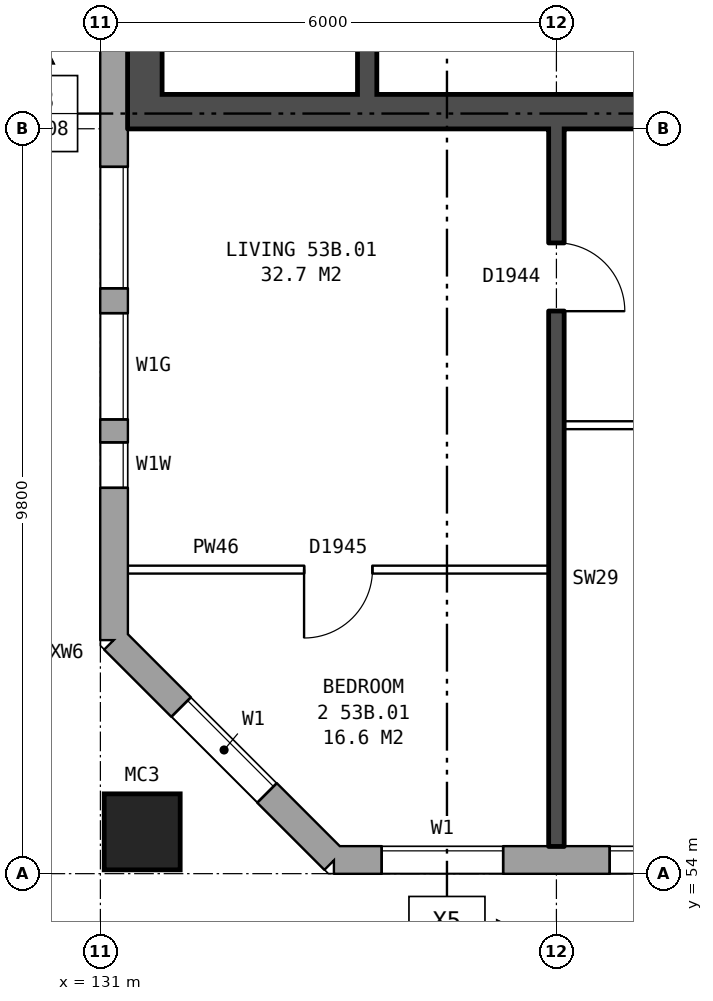
"""IFC4 building model, lengths in metres.
Left out: names, types, materials, properties, quantities, classifications, styles, units other than length and angle.
Written with IfcOpenShell. Run it as: python <this file> out.ifc"""

import sys

from ifc_helpers import new_model, si_unit, direction, frame, frame_2d, origin, origin_2d, place, context, subcontext, project, spatial, rectangle, hollow_rectangle, extrude, element, fill, save


model = new_model("IFC4")
c1 = context("Model", 3, precision=1e-05, world=origin(), true_north=direction((0.0, 1.0)))
c2 = subcontext(c1, "Body", "Model", "MODEL_VIEW")
j1 = project(units=[si_unit("LENGTHUNIT", "METRE"), si_unit("PLANEANGLEUNIT", "RADIAN")], contexts=[c1])
p1 = place(None, origin())
s1 = spatial("IfcSite", under=j1, at=p1, CompositionType="ELEMENT")
p2 = place(p1, origin())
s2 = spatial("IfcBuilding", under=s1, at=p2, CompositionType="ELEMENT")
p3 = place(p2, frame((0.0, 0.0, 188.2)))
s3 = spatial("IfcBuildingStorey", under=s2, at=p3, CompositionType="ELEMENT", Elevation=188.2)
p4 = place(p3, frame((131.55, 54.55, 0.0), z_axis=(0.0, 0.0, 1.0), x_axis=(1.0, 0.0, 0.0)))
e1 = element("IfcColumn", 1, at=p4, inside=s3, PredefinedType="COLUMN", context=c2, shape_type="SweptSolid", body=[
    extrude(hollow_rectangle(XDim=1.0, YDim=1.0, WallThickness=0.055, at=origin_2d()), origin(), (0.0, 0.0, 1.0), 3.1),
])
p5 = place(p3, frame((131.18, 57.075, 0.0), z_axis=(0.0, 0.0, 1.0), x_axis=(0.707106781187, -0.707106781187, 0.0)))
e2 = element("IfcWall", 2, at=p5, inside=s3, PredefinedType="STANDARD", context=c2, shape_type="SweptSolid", body=[
    extrude(rectangle(XDim=4.094, YDim=0.36, at=frame_2d((2.047, 0.0))), origin(), (0.0, 0.0, 1.0), 2.85),
])
p6 = place(p5, frame((1.247, 0.0, 0.8)))
e3 = element("IfcOpeningElement", 3, at=p6, cuts=e2, PredefinedType="OPENING", context=c2, shape_type="SweptSolid", body=[
    extrude(rectangle(XDim=1.6, YDim=1.8, at=frame_2d((0.8, 0.9))), frame((0.0, 0.19, 0.0), z_axis=(0.0, -1.0, 0.0), x_axis=(1.0, 0.0, 0.0)), (0.0, 0.0, 1.0), 0.38),
])
p7 = place(p3, frame((134.075, 54.18, 0.0), z_axis=(0.0, 0.0, 1.0), x_axis=(1.0, 0.0, 0.0)))
e4 = element("IfcWall", 4, at=p7, inside=s3, PredefinedType="STANDARD", context=c2, shape_type="SweptSolid", body=[
    extrude(rectangle(XDim=33.101, YDim=0.36, at=frame_2d((16.55, 0.0))), origin(), (0.0, 0.0, 1.0), 2.85),
])
p8 = place(p7, frame((0.625, 0.0, 0.8)))
e5 = element("IfcOpeningElement", 5, at=p8, cuts=e4, PredefinedType="OPENING", context=c2, shape_type="SweptSolid", body=[
    extrude(rectangle(XDim=1.6, YDim=1.8, at=frame_2d((0.8, 0.9))), frame((0.0, 0.19, 0.0), z_axis=(0.0, -1.0, 0.0), x_axis=(1.0, 0.0, 0.0)), (0.0, 0.0, 1.0), 0.38),
])
p9 = place(p7, frame((3.625, 0.0, 0.8)))
e6 = element("IfcOpeningElement", 6, at=p9, cuts=e4, PredefinedType="OPENING", context=c2, shape_type="SweptSolid", body=[
    extrude(rectangle(XDim=1.6, YDim=1.8, at=frame_2d((0.8, 0.9))), frame((0.0, 0.19, 0.0), z_axis=(0.0, -1.0, 0.0), x_axis=(1.0, 0.0, 0.0)), (0.0, 0.0, 1.0), 0.38),
])
p10 = place(p7, frame((6.625, 0.0, 0.8)))
e7 = element("IfcOpeningElement", 7, at=p10, cuts=e4, PredefinedType="OPENING", context=c2, shape_type="SweptSolid", body=[
    extrude(rectangle(XDim=1.6, YDim=1.8, at=frame_2d((0.8, 0.9))), frame((0.0, 0.19, 0.0), z_axis=(0.0, -1.0, 0.0), x_axis=(1.0, 0.0, 0.0)), (0.0, 0.0, 1.0), 0.38),
])
p11 = place(p7, frame((9.625, 0.0, 0.8)))
e8 = element("IfcOpeningElement", 8, at=p11, cuts=e4, PredefinedType="OPENING", context=c2, shape_type="SweptSolid", body=[
    extrude(rectangle(XDim=1.6, YDim=1.8, at=frame_2d((0.8, 0.9))), frame((0.0, 0.19, 0.0), z_axis=(0.0, -1.0, 0.0), x_axis=(1.0, 0.0, 0.0)), (0.0, 0.0, 1.0), 0.38),
])
p12 = place(p7, frame((12.975, 0.0, 0.15)))
e9 = element("IfcOpeningElement", 9, at=p12, cuts=e4, PredefinedType="OPENING", context=c2, shape_type="SweptSolid", body=[
    extrude(rectangle(XDim=0.6, YDim=0.9, at=frame_2d((0.3, 0.45))), frame((0.0, 0.19, 0.0), z_axis=(0.0, -1.0, 0.0), x_axis=(1.0, 0.0, 0.0)), (0.0, 0.0, 1.0), 0.38),
])
p13 = place(p7, frame((15.625, 0.0, 0.8)))
e10 = element("IfcOpeningElement", 10, at=p13, cuts=e4, PredefinedType="OPENING", context=c2, shape_type="SweptSolid", body=[
    extrude(rectangle(XDim=1.6, YDim=1.8, at=frame_2d((0.8, 0.9))), frame((0.0, 0.19, 0.0), z_axis=(0.0, -1.0, 0.0), x_axis=(1.0, 0.0, 0.0)), (0.0, 0.0, 1.0), 0.38),
])
p14 = place(p7, frame((18.075, 0.0, 0.45)))
e11 = element("IfcOpeningElement", 11, at=p14, cuts=e4, PredefinedType="OPENING", context=c2, shape_type="SweptSolid", body=[
    extrude(rectangle(XDim=1.0, YDim=1.8, at=frame_2d((0.5, 0.9))), frame((0.0, 0.19, 0.0), z_axis=(0.0, -1.0, 0.0), x_axis=(1.0, 0.0, 0.0)), (0.0, 0.0, 1.0), 0.38),
])
p15 = place(p7, frame((21.625, 0.0, 0.8)))
e12 = element("IfcOpeningElement", 12, at=p15, cuts=e4, PredefinedType="OPENING", context=c2, shape_type="SweptSolid", body=[
    extrude(rectangle(XDim=1.6, YDim=1.8, at=frame_2d((0.8, 0.9))), frame((0.0, 0.19, 0.0), z_axis=(0.0, -1.0, 0.0), x_axis=(1.0, 0.0, 0.0)), (0.0, 0.0, 1.0), 0.38),
])
p16 = place(p7, frame((24.625, 0.0, 0.8)))
e13 = element("IfcOpeningElement", 13, at=p16, cuts=e4, PredefinedType="OPENING", context=c2, shape_type="SweptSolid", body=[
    extrude(rectangle(XDim=1.6, YDim=1.8, at=frame_2d((0.8, 0.9))), frame((0.0, 0.19, 0.0), z_axis=(0.0, -1.0, 0.0), x_axis=(1.0, 0.0, 0.0)), (0.0, 0.0, 1.0), 0.38),
])
p17 = place(p7, frame((27.625, 0.0, 0.8)))
e14 = element("IfcOpeningElement", 14, at=p17, cuts=e4, PredefinedType="OPENING", context=c2, shape_type="SweptSolid", body=[
    extrude(rectangle(XDim=1.6, YDim=1.8, at=frame_2d((0.8, 0.9))), frame((0.0, 0.19, 0.0), z_axis=(0.0, -1.0, 0.0), x_axis=(1.0, 0.0, 0.0)), (0.0, 0.0, 1.0), 0.38),
])
p18 = place(p7, frame((30.625, 0.0, 0.8)))
e15 = element("IfcOpeningElement", 15, at=p18, cuts=e4, PredefinedType="OPENING", context=c2, shape_type="SweptSolid", body=[
    extrude(rectangle(XDim=1.6, YDim=1.8, at=frame_2d((0.8, 0.9))), frame((0.0, 0.19, 0.0), z_axis=(0.0, -1.0, 0.0), x_axis=(1.0, 0.0, 0.0)), (0.0, 0.0, 1.0), 0.38),
])
p19 = place(p7, frame((13.875, 0.0, 0.25)))
e16 = element("IfcOpeningElement", 16, at=p19, cuts=e4, PredefinedType="OPENING", context=c2, shape_type="SweptSolid", body=[
    extrude(rectangle(XDim=0.8, YDim=1.8, at=frame_2d((0.4, 0.9))), frame((0.0, 0.19, 0.0), z_axis=(0.0, -1.0, 0.0), x_axis=(1.0, 0.0, 0.0)), (0.0, 0.0, 1.0), 0.38),
])
p20 = place(p7, frame((19.375, 0.0, 0.35)))
e17 = element("IfcOpeningElement", 17, at=p20, cuts=e4, PredefinedType="OPENING", context=c2, shape_type="SweptSolid", body=[
    extrude(rectangle(XDim=0.6, YDim=0.9, at=frame_2d((0.3, 0.45))), frame((0.0, 0.19, 0.0), z_axis=(0.0, -1.0, 0.0), x_axis=(1.0, 0.0, 0.0)), (0.0, 0.0, 1.0), 0.38),
])
p21 = place(p3, frame((131.18, 82.925, 0.0), z_axis=(0.0, 0.0, 1.0), x_axis=(0.0, -1.0, 0.0)))
e18 = element("IfcWall", 18, at=p21, inside=s3, PredefinedType="STANDARD", context=c2, shape_type="SweptSolid", body=[
    extrude(rectangle(XDim=25.851, YDim=0.36, at=frame_2d((12.925, 0.0))), origin(), (0.0, 0.0, 1.0), 2.85),
])
p22 = place(p21, frame((1.975, 0.0, 1.7)))
e19 = element("IfcOpeningElement", 19, at=p22, cuts=e18, PredefinedType="OPENING", context=c2, shape_type="SweptSolid", body=[
    extrude(rectangle(XDim=1.0, YDim=0.9, at=frame_2d((0.5, 0.45))), frame((0.0, 0.19, 0.0), z_axis=(0.0, -1.0, 0.0), x_axis=(1.0, 0.0, 0.0)), (0.0, 0.0, 1.0), 0.38),
])
p23 = place(p21, frame((4.625, 0.0, 0.8)))
e20 = element("IfcOpeningElement", 20, at=p23, cuts=e18, PredefinedType="OPENING", context=c2, shape_type="SweptSolid", body=[
    extrude(rectangle(XDim=1.6, YDim=1.8, at=frame_2d((0.8, 0.9))), frame((0.0, 0.19, 0.0), z_axis=(0.0, -1.0, 0.0), x_axis=(1.0, 0.0, 0.0)), (0.0, 0.0, 1.0), 0.38),
])
p24 = place(p21, frame((19.625, 0.0, 0.8)))
e21 = element("IfcOpeningElement", 21, at=p24, cuts=e18, PredefinedType="OPENING", context=c2, shape_type="SweptSolid", body=[
    extrude(rectangle(XDim=1.6, YDim=1.8, at=frame_2d((0.8, 0.9))), frame((0.0, 0.19, 0.0), z_axis=(0.0, -1.0, 0.0), x_axis=(1.0, 0.0, 0.0)), (0.0, 0.0, 1.0), 0.38),
])
p25 = place(p21, frame((21.55, 0.0, 1.1)))
e22 = element("IfcOpeningElement", 22, at=p25, cuts=e18, PredefinedType="OPENING", context=c2, shape_type="SweptSolid", body=[
    extrude(rectangle(XDim=1.4, YDim=1.5, at=frame_2d((0.7, 0.75))), frame((0.0, 0.19, 0.0), z_axis=(0.0, -1.0, 0.0), x_axis=(1.0, 0.0, 0.0)), (0.0, 0.0, 1.0), 0.38),
])
p26 = place(p21, frame((3.325, 0.0, 0.8)))
e23 = element("IfcOpeningElement", 23, at=p26, cuts=e18, PredefinedType="OPENING", context=c2, shape_type="SweptSolid", body=[
    extrude(rectangle(XDim=1.0, YDim=1.8, at=frame_2d((0.5, 0.9))), frame((0.0, 0.19, 0.0), z_axis=(0.0, -1.0, 0.0), x_axis=(1.0, 0.0, 0.0)), (0.0, 0.0, 1.0), 0.38),
])
p27 = place(p21, frame((23.25, 0.0, 1.7)))
e24 = element("IfcOpeningElement", 24, at=p27, cuts=e18, PredefinedType="OPENING", context=c2, shape_type="SweptSolid", body=[
    extrude(rectangle(XDim=0.6, YDim=0.9, at=frame_2d((0.3, 0.45))), frame((0.0, 0.19, 0.0), z_axis=(0.0, -1.0, 0.0), x_axis=(1.0, 0.0, 0.0)), (0.0, 0.0, 1.0), 0.38),
])
p28 = place(p3, frame((131.585, 63.8, 0.0), z_axis=(0.0, 0.0, 1.0), x_axis=(0.0, 1.0, 0.0)))
e25 = element("IfcWall", 25, at=p28, inside=s3, PredefinedType="SHEAR", context=c2, shape_type="SweptSolid", body=[
    extrude(rectangle(XDim=12.4, YDim=0.45, at=frame_2d((6.2, 0.0))), origin(), (0.0, 0.0, 1.0), 2.85),
])
p29 = place(p3, frame((139.31, 64.025, 0.0), z_axis=(0.0, 0.0, 1.0), x_axis=(-1.0, 0.0, 0.0)))
e26 = element("IfcWall", 26, at=p29, inside=s3, PredefinedType="SHEAR", context=c2, shape_type="SweptSolid", body=[
    extrude(rectangle(XDim=7.5, YDim=0.45, at=frame_2d((3.75, 0.0))), origin(), (0.0, 0.0, 1.0), 2.85),
])
p30 = place(p3, frame((134.51, 64.25, 0.0), z_axis=(0.0, 0.0, 1.0), x_axis=(0.0, 1.0, 0.0)))
e27 = element("IfcWall", 27, at=p30, inside=s3, PredefinedType="SHEAR", context=c2, shape_type="SweptSolid", body=[
    extrude(rectangle(XDim=6.875, YDim=0.25, at=frame_2d((3.438, 0.0))), origin(), (0.0, 0.0, 1.0), 2.85),
])
p31 = place(p3, frame((131.36, 58.0, 0.0), z_axis=(0.0, 0.0, 1.0), x_axis=(1.0, 0.0, 0.0)))
e28 = element("IfcWall", 28, at=p31, inside=s3, PredefinedType="PARTITIONING", context=c2, shape_type="SweptSolid", body=[
    extrude(rectangle(XDim=5.54, YDim=0.1, at=frame_2d((2.77, 0.0))), origin(), (0.0, 0.0, 1.0), 2.85),
])
p32 = place(p31, frame((2.32, 0.0, 0.0)))
e29 = element("IfcOpeningElement", 29, at=p32, cuts=e28, PredefinedType="OPENING", context=c2, shape_type="SweptSolid", body=[
    extrude(rectangle(XDim=0.9, YDim=2.1, at=frame_2d((0.45, 1.05))), frame((0.0, 0.06, 0.0), z_axis=(0.0, -1.0, 0.0), x_axis=(1.0, 0.0, 0.0)), (0.0, 0.0, 1.0), 0.12),
])
p33 = place(p3, frame((137.1, 59.9, 0.0), z_axis=(0.0, 0.0, 1.0), x_axis=(1.0, 0.0, 0.0)))
e30 = element("IfcWall", 30, at=p33, inside=s3, PredefinedType="PARTITIONING", context=c2, shape_type="SweptSolid", body=[
    extrude(rectangle(XDim=5.8, YDim=0.1, at=frame_2d((2.9, 0.0))), origin(), (0.0, 0.0, 1.0), 2.85),
])
p34 = place(p33, frame((1.3, 0.0, 0.0)))
e31 = element("IfcOpeningElement", 31, at=p34, cuts=e30, PredefinedType="OPENING", context=c2, shape_type="SweptSolid", body=[
    extrude(rectangle(XDim=0.9, YDim=2.1, at=frame_2d((0.45, 1.05))), frame((0.0, 0.06, 0.0), z_axis=(0.0, -1.0, 0.0), x_axis=(1.0, 0.0, 0.0)), (0.0, 0.0, 1.0), 0.12),
])
p35 = place(p33, frame((4.2, 0.0, 0.0)))
e32 = element("IfcOpeningElement", 32, at=p35, cuts=e30, PredefinedType="OPENING", context=c2, shape_type="SweptSolid", body=[
    extrude(rectangle(XDim=0.9, YDim=2.1, at=frame_2d((0.45, 1.05))), frame((0.0, 0.06, 0.0), z_axis=(0.0, -1.0, 0.0), x_axis=(1.0, 0.0, 0.0)), (0.0, 0.0, 1.0), 0.12),
])
p36 = place(p3, frame((137.0, 54.36, 0.0), z_axis=(0.0, 0.0, 1.0), x_axis=(0.0, 1.0, 0.0)))
e33 = element("IfcWall", 33, at=p36, inside=s3, PredefinedType="SOLIDWALL", context=c2, shape_type="SweptSolid", body=[
    extrude(rectangle(XDim=9.44, YDim=0.2, at=frame_2d((4.72, 0.0))), origin(), (0.0, 0.0, 1.0), 2.85),
])
p37 = place(p36, frame((7.04, 0.0, 0.0)))
e34 = element("IfcOpeningElement", 34, at=p37, cuts=e33, PredefinedType="OPENING", context=c2, shape_type="SweptSolid", body=[
    extrude(rectangle(XDim=0.9, YDim=2.1, at=frame_2d((0.45, 1.05))), frame((0.0, 0.11, 0.0), z_axis=(0.0, -1.0, 0.0), x_axis=(1.0, 0.0, 0.0)), (0.0, 0.0, 1.0), 0.22),
])
p38 = place(p6, origin())
e35 = element("IfcWindow", 35, at=p38, inside=s3, PartitioningType="SINGLE_PANEL", PredefinedType="WINDOW", context=c2, shape_type="SweptSolid", body=[
    extrude(rectangle(XDim=1.6, YDim=1.8, at=frame_2d((0.8, 0.9))), frame((0.0, 0.15, 0.0), z_axis=(0.0, -1.0, 0.0), x_axis=(1.0, 0.0, 0.0)), (0.0, 0.0, 1.0), 0.06),
])
fill(e3, e35)
p39 = place(p8, origin())
e36 = element("IfcWindow", 36, at=p39, inside=s3, PartitioningType="SINGLE_PANEL", PredefinedType="WINDOW", context=c2, shape_type="SweptSolid", body=[
    extrude(rectangle(XDim=1.6, YDim=1.8, at=frame_2d((0.8, 0.9))), frame((0.0, 0.15, 0.0), z_axis=(0.0, -1.0, 0.0), x_axis=(1.0, 0.0, 0.0)), (0.0, 0.0, 1.0), 0.06),
])
fill(e5, e36)
p40 = place(p9, origin())
e37 = element("IfcWindow", 37, at=p40, inside=s3, PartitioningType="SINGLE_PANEL", PredefinedType="WINDOW", context=c2, shape_type="SweptSolid", body=[
    extrude(rectangle(XDim=1.6, YDim=1.8, at=frame_2d((0.8, 0.9))), frame((0.0, 0.15, 0.0), z_axis=(0.0, -1.0, 0.0), x_axis=(1.0, 0.0, 0.0)), (0.0, 0.0, 1.0), 0.06),
])
fill(e6, e37)
p41 = place(p24, origin())
e38 = element("IfcWindow", 38, at=p41, inside=s3, PartitioningType="SINGLE_PANEL", PredefinedType="WINDOW", context=c2, shape_type="SweptSolid", body=[
    extrude(rectangle(XDim=1.6, YDim=1.8, at=frame_2d((0.8, 0.9))), frame((0.0, 0.15, 0.0), z_axis=(0.0, -1.0, 0.0), x_axis=(1.0, 0.0, 0.0)), (0.0, 0.0, 1.0), 0.06),
])
fill(e21, e38)
p42 = place(p25, origin())
e39 = element("IfcWindow", 39, at=p42, inside=s3, PartitioningType="SINGLE_PANEL", PredefinedType="WINDOW", context=c2, shape_type="SweptSolid", body=[
    extrude(rectangle(XDim=1.4, YDim=1.5, at=frame_2d((0.7, 0.75))), frame((0.0, 0.15, 0.0), z_axis=(0.0, -1.0, 0.0), x_axis=(1.0, 0.0, 0.0)), (0.0, 0.0, 1.0), 0.06),
])
fill(e22, e39)
p43 = place(p32, frame((0.9, 0.0, 0.0), z_axis=(0.0, 0.0, 1.0), x_axis=(-1.0, 0.0, 0.0)))
e40 = element("IfcDoor", 40, at=p43, inside=s3, OperationType="SINGLE_SWING_RIGHT", PredefinedType="DOOR", context=c2, shape_type="SweptSolid", body=[
    extrude(rectangle(XDim=0.9, YDim=2.1, at=frame_2d((0.45, 1.05))), frame((0.0, 0.025, 0.0), z_axis=(0.0, -1.0, 0.0), x_axis=(1.0, 0.0, 0.0)), (0.0, 0.0, 1.0), 0.05),
])
fill(e29, e40)
p44 = place(p37, frame((0.9, 0.0, 0.0), z_axis=(0.0, 0.0, 1.0), x_axis=(-1.0, 0.0, 0.0)))
e41 = element("IfcDoor", 41, at=p44, inside=s3, OperationType="SINGLE_SWING_RIGHT", PredefinedType="DOOR", context=c2, shape_type="SweptSolid", body=[
    extrude(rectangle(XDim=0.9, YDim=2.1, at=frame_2d((0.45, 1.05))), frame((0.0, 0.025, 0.0), z_axis=(0.0, -1.0, 0.0), x_axis=(1.0, 0.0, 0.0)), (0.0, 0.0, 1.0), 0.05),
])
fill(e34, e41)
p45 = place(p27, origin())
e42 = element("IfcWindow", 42, at=p45, inside=s3, PartitioningType="SINGLE_PANEL", PredefinedType="WINDOW", context=c2, shape_type="SweptSolid", body=[
    extrude(rectangle(XDim=0.6, YDim=0.9, at=frame_2d((0.3, 0.45))), frame((0.0, 0.15, 0.0), z_axis=(0.0, -1.0, 0.0), x_axis=(1.0, 0.0, 0.0)), (0.0, 0.0, 1.0), 0.06),
])
fill(e24, e42)
save(model, sys.argv[1])
